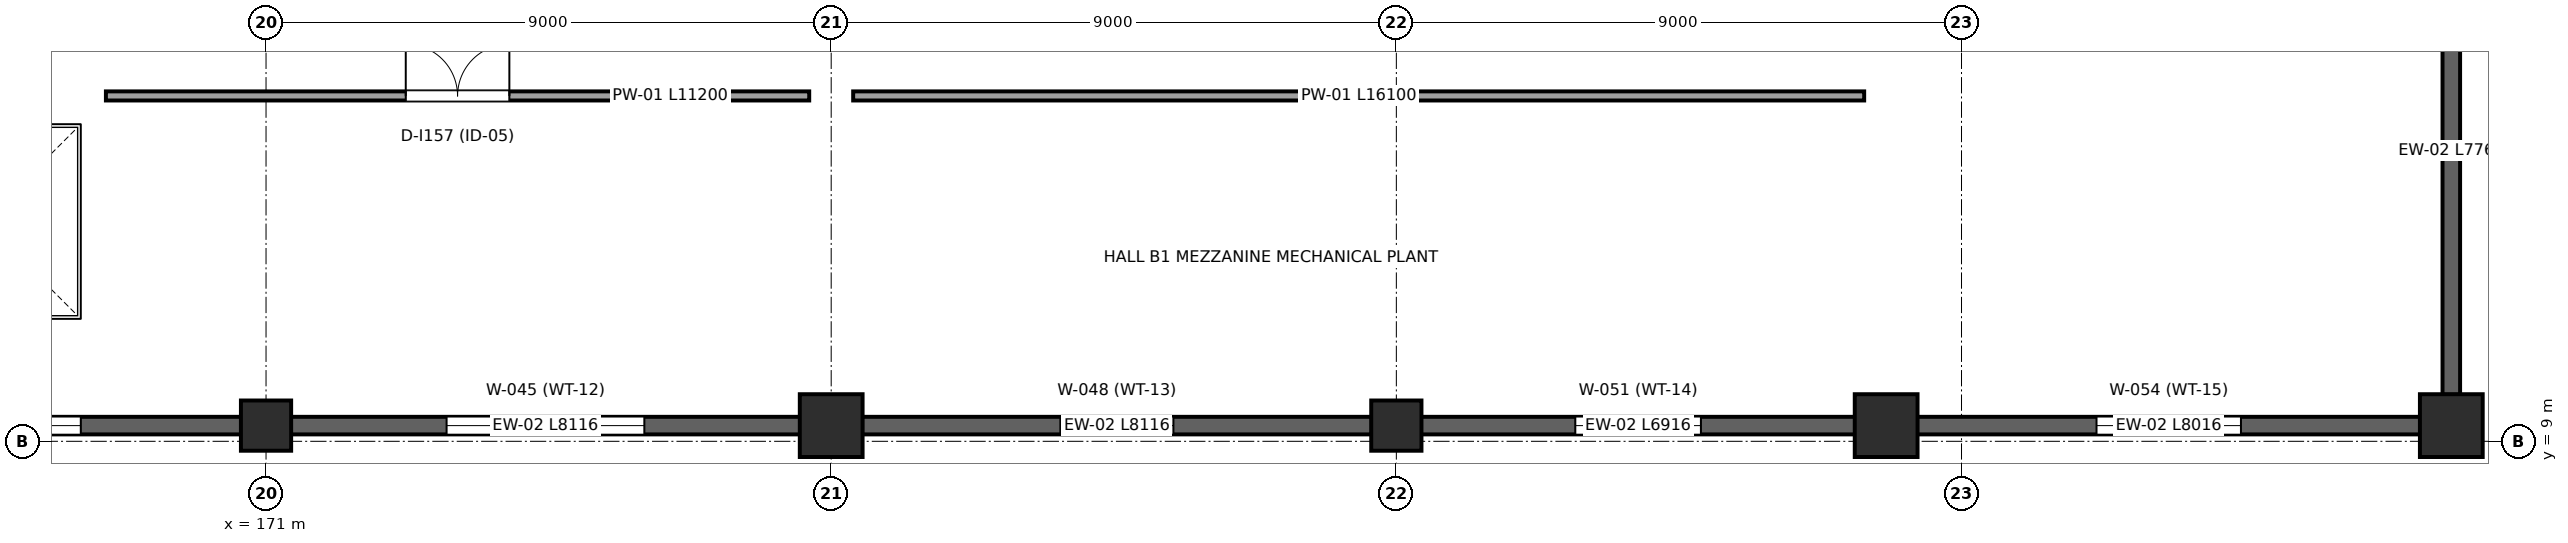
"""IFC4 building model, lengths in metres.
Left out: names, types, materials, properties, quantities, classifications, styles, units other than length and angle.
Written with IfcOpenShell. Run it as: python <this file> out.ifc"""

import sys

from ifc_helpers import new_model, si_unit, direction, frame, frame_2d, origin, origin_2d, place, context, subcontext, project, spatial, rectangle, extrude, element, fill, save


model = new_model("IFC4")
c1 = context("Model", 3, precision=1e-05, world=origin(), true_north=direction((0.0, 1.0)))
c2 = subcontext(c1, "Body", "Model", "MODEL_VIEW")
j1 = project(units=[si_unit("LENGTHUNIT", "METRE"), si_unit("PLANEANGLEUNIT", "RADIAN")], contexts=[c1])
p1 = place(None, origin())
s1 = spatial("IfcSite", under=j1, at=p1, CompositionType="ELEMENT")
p2 = place(p1, origin())
s2 = spatial("IfcBuilding", under=s1, at=p2, CompositionType="ELEMENT")
p3 = place(p2, frame((0.0, 0.0, 6.0)))
s3 = spatial("IfcBuildingStorey", under=s2, at=p3, CompositionType="ELEMENT", Elevation=6.0)
for number, where, z_axis, x_axis in (
    (1, (180.0, 9.25, 0.0), (0.0, 0.0, 1.0), (1.0, 0.0, 0.0)),
    (2, (196.8, 9.25, 0.0), (0.0, 0.0, 1.0), (1.0, 0.0, 0.0)),
    (3, (205.8, 9.25, 0.0), (0.0, 0.0, 1.0), (1.0, 0.0, 0.0)),
):
    element("IfcColumn", number, at=place(p3, frame(where, z_axis=z_axis, x_axis=x_axis)), inside=s3, PredefinedType="COLUMN", context=c2, shape_type="SweptSolid", body=[
        extrude(rectangle(XDim=1.0, YDim=1.0, at=origin_2d()), origin(), (0.0, 0.0, 1.0), 6.0),
    ])
for number, where, z_axis, x_axis in (
    (4, (171.0, 9.25, 0.0), (0.0, 0.0, 1.0), (1.0, 0.0, 0.0)),
    (5, (189.0, 9.25, 0.0), (0.0, 0.0, 1.0), (1.0, 0.0, 0.0)),
):
    element("IfcColumn", number, at=place(p3, frame(where, z_axis=z_axis, x_axis=x_axis)), inside=s3, PredefinedType="COLUMN", context=c2, shape_type="SweptSolid", body=[
        extrude(rectangle(XDim=0.8, YDim=0.8, at=origin_2d()), origin(), (0.0, 0.0, 1.0), 6.0),
    ])
p4 = place(p3, frame((170.608, 9.25, 0.0), z_axis=(0.0, 0.0, 1.0), x_axis=(-1.0, 0.0, 0.0)))
e6 = element("IfcWall", 6, at=p4, inside=s3, PredefinedType="STANDARD", context=c2, shape_type="SweptSolid", body=[
    extrude(rectangle(XDim=8.116, YDim=0.28, at=frame_2d((4.058, 0.0))), origin(), (0.0, 0.0, 1.0), 5.7),
])
p5 = place(p4, frame((2.558, 0.0, 1.1)))
e7 = element("IfcOpeningElement", 7, at=p5, cuts=e6, PredefinedType="OPENING", context=c2, shape_type="SweptSolid", body=[
    extrude(rectangle(XDim=3.0, YDim=2.4, at=frame_2d((1.5, 1.2))), frame((0.0, 0.15, 0.0), z_axis=(0.0, -1.0, 0.0), x_axis=(1.0, 0.0, 0.0)), (0.0, 0.0, 1.0), 0.3),
])
p6 = place(p3, frame((179.508, 9.25, 0.0), z_axis=(0.0, 0.0, 1.0), x_axis=(-1.0, 0.0, 0.0)))
e8 = element("IfcWall", 8, at=p6, inside=s3, PredefinedType="STANDARD", context=c2, shape_type="SweptSolid", body=[
    extrude(rectangle(XDim=8.116, YDim=0.28, at=frame_2d((4.058, 0.0))), origin(), (0.0, 0.0, 1.0), 5.7),
])
p7 = place(p6, frame((2.483, 0.0, 1.1)))
e9 = element("IfcOpeningElement", 9, at=p7, cuts=e8, PredefinedType="OPENING", context=c2, shape_type="SweptSolid", body=[
    extrude(rectangle(XDim=3.15, YDim=2.4, at=frame_2d((1.575, 1.2))), frame((0.0, 0.15, 0.0), z_axis=(0.0, -1.0, 0.0), x_axis=(1.0, 0.0, 0.0)), (0.0, 0.0, 1.0), 0.3),
])
p8 = place(p3, frame((188.608, 9.25, 0.0), z_axis=(0.0, 0.0, 1.0), x_axis=(-1.0, 0.0, 0.0)))
e10 = element("IfcWall", 10, at=p8, inside=s3, PredefinedType="STANDARD", context=c2, shape_type="SweptSolid", body=[
    extrude(rectangle(XDim=8.116, YDim=0.28, at=frame_2d((4.058, 0.0))), origin(), (0.0, 0.0, 1.0), 5.7),
])
p9 = place(p8, frame((3.158, 0.0, 1.1)))
e11 = element("IfcOpeningElement", 11, at=p9, cuts=e10, PredefinedType="OPENING", context=c2, shape_type="SweptSolid", body=[
    extrude(rectangle(XDim=1.8, YDim=2.15, at=frame_2d((0.9, 1.075))), frame((0.0, 0.15, 0.0), z_axis=(0.0, -1.0, 0.0), x_axis=(1.0, 0.0, 0.0)), (0.0, 0.0, 1.0), 0.3),
])
p10 = place(p3, frame((196.308, 9.25, 0.0), z_axis=(0.0, 0.0, 1.0), x_axis=(-1.0, 0.0, 0.0)))
e12 = element("IfcWall", 12, at=p10, inside=s3, PredefinedType="STANDARD", context=c2, shape_type="SweptSolid", body=[
    extrude(rectangle(XDim=6.916, YDim=0.28, at=frame_2d((3.458, 0.0))), origin(), (0.0, 0.0, 1.0), 5.7),
])
p11 = place(p10, frame((2.458, 0.0, 1.1)))
e13 = element("IfcOpeningElement", 13, at=p11, cuts=e12, PredefinedType="OPENING", context=c2, shape_type="SweptSolid", body=[
    extrude(rectangle(XDim=2.0, YDim=2.15, at=frame_2d((1.0, 1.075))), frame((0.0, 0.15, 0.0), z_axis=(0.0, -1.0, 0.0), x_axis=(1.0, 0.0, 0.0)), (0.0, 0.0, 1.0), 0.3),
])
p12 = place(p3, frame((205.308, 9.25, 0.0), z_axis=(0.0, 0.0, 1.0), x_axis=(-1.0, 0.0, 0.0)))
e14 = element("IfcWall", 14, at=p12, inside=s3, PredefinedType="STANDARD", context=c2, shape_type="SweptSolid", body=[
    extrude(rectangle(XDim=8.016, YDim=0.28, at=frame_2d((4.008, 0.0))), origin(), (0.0, 0.0, 1.0), 5.7),
])
p13 = place(p12, frame((2.858, 0.0, 1.1)))
e15 = element("IfcOpeningElement", 15, at=p13, cuts=e14, PredefinedType="OPENING", context=c2, shape_type="SweptSolid", body=[
    extrude(rectangle(XDim=2.3, YDim=2.15, at=frame_2d((1.15, 1.075))), frame((0.0, 0.15, 0.0), z_axis=(0.0, -1.0, 0.0), x_axis=(1.0, 0.0, 0.0)), (0.0, 0.0, 1.0), 0.3),
])
p14 = place(p3, frame((205.8, 17.508, 0.0), z_axis=(0.0, 0.0, 1.0), x_axis=(0.0, -1.0, 0.0)))
e16 = element("IfcWall", 16, at=p14, inside=s3, PredefinedType="STANDARD", context=c2, shape_type="SweptSolid", body=[
    extrude(rectangle(XDim=7.766, YDim=0.28, at=frame_2d((3.883, 0.0))), origin(), (0.0, 0.0, 1.0), 5.7),
])
p15 = place(p3, frame((168.45, 14.5, 0.0), z_axis=(0.0, 0.0, 1.0), x_axis=(1.0, 0.0, 0.0)))
e17 = element("IfcWall", 17, at=p15, inside=s3, PredefinedType="PARTITIONING", context=c2, shape_type="SweptSolid", body=[
    extrude(rectangle(XDim=11.2, YDim=0.145, at=frame_2d((5.6, 0.0))), origin(), (0.0, 0.0, 1.0), 4.55),
])
p16 = place(p15, frame((4.775, 0.0, 0.0)))
e18 = element("IfcOpeningElement", 18, at=p16, cuts=e17, PredefinedType="OPENING", context=c2, shape_type="SweptSolid", body=[
    extrude(rectangle(XDim=1.65, YDim=2.25, at=frame_2d((0.825, 1.125))), frame((0.0, 0.083, 0.0), z_axis=(0.0, -1.0, 0.0), x_axis=(1.0, 0.0, 0.0)), (0.0, 0.0, 1.0), 0.165),
])
p17 = place(p3, frame((180.35, 14.5, 0.0), z_axis=(0.0, 0.0, 1.0), x_axis=(1.0, 0.0, 0.0)))
e19 = element("IfcWall", 19, at=p17, inside=s3, PredefinedType="PARTITIONING", context=c2, shape_type="SweptSolid", body=[
    extrude(rectangle(XDim=16.1, YDim=0.145, at=frame_2d((8.05, 0.0))), origin(), (0.0, 0.0, 1.0), 4.55),
])
p18 = place(p5, origin())
e20 = element("IfcWindow", 20, at=p18, inside=s3, PartitioningType="SINGLE_PANEL", PredefinedType="WINDOW", context=c2, shape_type="SweptSolid", body=[
    extrude(rectangle(XDim=3.0, YDim=2.4, at=frame_2d((1.5, 1.2))), frame((0.0, 0.03, 0.0), z_axis=(0.0, -1.0, 0.0), x_axis=(1.0, 0.0, 0.0)), (0.0, 0.0, 1.0), 0.06),
])
fill(e7, e20)
p19 = place(p7, origin())
e21 = element("IfcWindow", 21, at=p19, inside=s3, PartitioningType="SINGLE_PANEL", PredefinedType="WINDOW", context=c2, shape_type="SweptSolid", body=[
    extrude(rectangle(XDim=3.15, YDim=2.4, at=frame_2d((1.575, 1.2))), frame((0.0, 0.03, 0.0), z_axis=(0.0, -1.0, 0.0), x_axis=(1.0, 0.0, 0.0)), (0.0, 0.0, 1.0), 0.06),
])
fill(e9, e21)
p20 = place(p9, origin())
e22 = element("IfcWindow", 22, at=p20, inside=s3, PartitioningType="SINGLE_PANEL", PredefinedType="WINDOW", context=c2, shape_type="SweptSolid", body=[
    extrude(rectangle(XDim=1.8, YDim=2.15, at=frame_2d((0.9, 1.075))), frame((0.0, 0.03, 0.0), z_axis=(0.0, -1.0, 0.0), x_axis=(1.0, 0.0, 0.0)), (0.0, 0.0, 1.0), 0.06),
])
fill(e11, e22)
p21 = place(p11, origin())
e23 = element("IfcWindow", 23, at=p21, inside=s3, PartitioningType="SINGLE_PANEL", PredefinedType="WINDOW", context=c2, shape_type="SweptSolid", body=[
    extrude(rectangle(XDim=2.0, YDim=2.15, at=frame_2d((1.0, 1.075))), frame((0.0, 0.03, 0.0), z_axis=(0.0, -1.0, 0.0), x_axis=(1.0, 0.0, 0.0)), (0.0, 0.0, 1.0), 0.06),
])
fill(e13, e23)
p22 = place(p13, origin())
e24 = element("IfcWindow", 24, at=p22, inside=s3, PartitioningType="SINGLE_PANEL", PredefinedType="WINDOW", context=c2, shape_type="SweptSolid", body=[
    extrude(rectangle(XDim=2.3, YDim=2.15, at=frame_2d((1.15, 1.075))), frame((0.0, 0.03, 0.0), z_axis=(0.0, -1.0, 0.0), x_axis=(1.0, 0.0, 0.0)), (0.0, 0.0, 1.0), 0.06),
])
fill(e15, e24)
p23 = place(p16, origin())
e25 = element("IfcDoor", 25, at=p23, inside=s3, OperationType="DOUBLE_DOOR_SINGLE_SWING", PredefinedType="DOOR", context=c2, shape_type="SweptSolid", body=[
    extrude(rectangle(XDim=1.65, YDim=2.25, at=frame_2d((0.825, 1.125))), frame((0.0, 0.025, 0.0), z_axis=(0.0, -1.0, 0.0), x_axis=(1.0, 0.0, 0.0)), (0.0, 0.0, 1.0), 0.05),
])
fill(e18, e25)
save(model, sys.argv[1])
